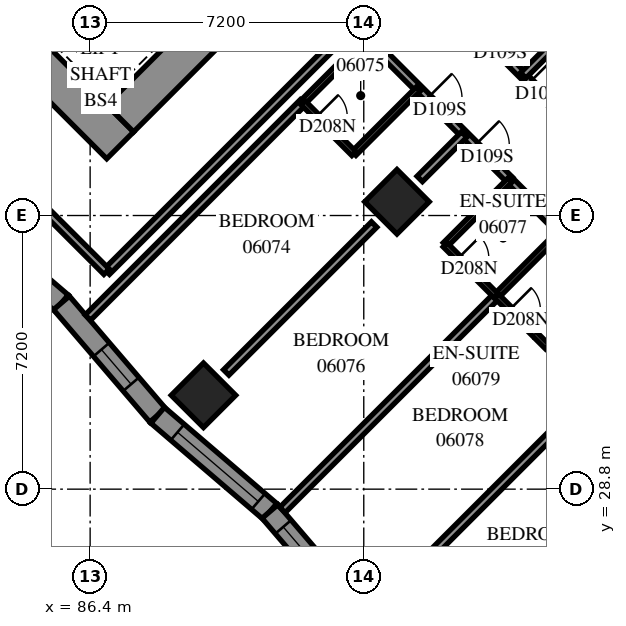
"""IFC4 building model, lengths in metres.
Left out: names, types, materials, properties, quantities, classifications, styles, units other than length and angle.
Written with IfcOpenShell. Run it as: python <this file> out.ifc"""

import sys

from ifc_helpers import new_model, si_unit, direction, frame, frame_2d, origin, origin_2d, place, context, subcontext, project, spatial, polyline, rectangle, outline, extrude, element, fill, save


model = new_model("IFC4")
c1 = context("Model", 3, precision=1e-05, world=origin(), true_north=direction((0.0, 1.0)))
c2 = subcontext(c1, "Body", "Model", "MODEL_VIEW")
j1 = project(units=[si_unit("LENGTHUNIT", "METRE"), si_unit("PLANEANGLEUNIT", "RADIAN")], contexts=[c1])
p1 = place(None, origin())
s1 = spatial("IfcSite", under=j1, at=p1, CompositionType="ELEMENT")
p2 = place(p1, origin())
s2 = spatial("IfcBuilding", under=s1, at=p2, CompositionType="ELEMENT")
p3 = place(p2, frame((0.0, 0.0, 27.0)))
s3 = spatial("IfcBuildingStorey", under=s2, at=p3, CompositionType="ELEMENT", Elevation=27.0)
for number, where, z_axis, x_axis in (
    (1, (94.474, 36.362, 0.0), (0.0, 0.0, 1.0), (0.707, -0.707, 0.0)),
    (2, (89.382, 31.271, 0.0), (0.0, 0.0, 1.0), (0.707, -0.707, 0.0)),
):
    element("IfcColumn", number, at=place(p3, frame(where, z_axis=z_axis, x_axis=x_axis)), inside=s3, PredefinedType="COLUMN", context=c2, shape_type="SweptSolid", body=[
        extrude(rectangle(XDim=1.2, YDim=1.2, at=origin_2d()), origin(), (0.0, 0.0, 1.0), 3.1),
    ])
p4 = place(p3, frame((75.594, 49.443, -0.3), z_axis=(0.0, 0.0, 1.0), x_axis=(0.7071037324, -0.70710983, 0.0)))
e3 = element("IfcWall", 3, at=p4, inside=s3, PredefinedType="SHEAR", context=c2, shape_type="SweptSolid", body=[
    extrude(rectangle(XDim=16.4, YDim=1.0, at=frame_2d((8.2, 0.0))), origin(), (0.0, 0.0, 1.0), 2.7),
])
p5 = place(p3, frame((87.19, 38.554, -0.3), z_axis=(0.0, 0.0, 1.0), x_axis=(0.707103309, 0.7071102534, 0.0)))
e4 = element("IfcWall", 4, at=p5, inside=s3, PredefinedType="SHEAR", context=c2, shape_type="SweptSolid", body=[
    extrude(rectangle(XDim=14.4, YDim=1.0, at=frame_2d((7.2, 0.0))), origin(), (0.0, 0.0, 1.0), 2.7),
])
p6 = place(p5, frame((4.55, 0.0, 0.3)))
e5 = element("IfcOpeningElement", 5, at=p6, cuts=e4, PredefinedType="OPENING", context=c2, shape_type="SweptSolid", body=[
    extrude(rectangle(XDim=1.1, YDim=2.1, at=frame_2d((0.55, 1.05))), frame((0.0, 0.51, 0.0), z_axis=(0.0, -1.0, 0.0), x_axis=(1.0, 0.0, 0.0)), (0.0, 0.0, 1.0), 1.02),
])
p7 = place(p5, frame((11.35, 0.0, 0.3)))
e6 = element("IfcOpeningElement", 6, at=p7, cuts=e4, PredefinedType="OPENING", context=c2, shape_type="SweptSolid", body=[
    extrude(rectangle(XDim=1.1, YDim=2.1, at=frame_2d((0.55, 1.05))), frame((0.0, 0.51, 0.0), z_axis=(0.0, -1.0, 0.0), x_axis=(1.0, 0.0, 0.0)), (0.0, 0.0, 1.0), 1.02),
])
p8 = place(p3, frame((82.69, 36.232, 0.0), z_axis=(0.0, 0.0, 1.0), x_axis=(0.7595050452, -0.6505014115, 0.0)))
e7 = element("IfcWall", 7, at=p8, inside=s3, PredefinedType="SOLIDWALL", context=c2, shape_type="SweptSolid", body=[
    extrude(outline(polyline([(-0.021, -0.275), (3.87, -0.275), (3.913, 0.275), (0.021, 0.275), (-0.021, -0.275)])), origin(), (0.0, 0.0, 1.0), 3.1),
])
p9 = place(p8, frame((1.768, 0.0, 0.5)))
e8 = element("IfcOpeningElement", 8, at=p9, cuts=e7, PredefinedType="OPENING", context=c2, shape_type="SweptSolid", body=[
    extrude(rectangle(XDim=1.2, YDim=2.45, at=frame_2d((0.6, 1.225))), frame((0.0, 0.285, 0.0), z_axis=(0.0, -1.0, 0.0), x_axis=(1.0, 0.0, 0.0)), (0.0, 0.0, 1.0), 0.57),
])
p10 = place(p3, frame((85.645, 33.7, 0.0), z_axis=(0.0, 0.0, 1.0), x_axis=(0.6505014115, -0.7595050452, 0.0)))
e9 = element("IfcWall", 9, at=p10, inside=s3, PredefinedType="SOLIDWALL", context=c2, shape_type="SweptSolid", body=[
    extrude(outline(polyline([(0.021, -0.275), (3.913, -0.275), (3.87, 0.275), (-0.021, 0.275), (0.021, -0.275)])), origin(), (0.0, 0.0, 1.0), 3.1),
])
p11 = place(p10, frame((1.617, 0.0, 0.5)))
e10 = element("IfcOpeningElement", 10, at=p11, cuts=e9, PredefinedType="OPENING", context=c2, shape_type="SweptSolid", body=[
    extrude(rectangle(XDim=1.2, YDim=2.45, at=frame_2d((0.6, 1.225))), frame((0.0, 0.285, 0.0), z_axis=(0.0, -1.0, 0.0), x_axis=(1.0, 0.0, 0.0)), (0.0, 0.0, 1.0), 0.57),
])
p12 = place(p3, frame((88.177, 30.745, 0.0), z_axis=(0.0, 0.0, 1.0), x_axis=(0.7595159183, -0.6504887161, 0.0)))
e11 = element("IfcWall", 11, at=p12, inside=s3, PredefinedType="SOLIDWALL", context=c2, shape_type="SweptSolid", body=[
    extrude(outline(polyline([(-0.021, -0.275), (3.87, -0.275), (3.913, 0.275), (0.021, 0.275), (-0.021, -0.275)])), origin(), (0.0, 0.0, 1.0), 3.1),
])
p13 = place(p12, frame((0.687, 0.0, 0.5)))
e12 = element("IfcOpeningElement", 12, at=p13, cuts=e11, PredefinedType="OPENING", context=c2, shape_type="SweptSolid", body=[
    extrude(rectangle(XDim=2.8, YDim=2.45, at=frame_2d((1.4, 1.225))), frame((0.0, 0.285, 0.0), z_axis=(0.0, -1.0, 0.0), x_axis=(1.0, 0.0, 0.0)), (0.0, 0.0, 1.0), 0.57),
])
p14 = place(p3, frame((91.133, 28.213, 0.0), z_axis=(0.0, 0.0, 1.0), x_axis=(0.6504887161, -0.7595159183, 0.0)))
e13 = element("IfcWall", 13, at=p14, inside=s3, PredefinedType="SOLIDWALL", context=c2, shape_type="SweptSolid", body=[
    extrude(outline(polyline([(0.021, -0.275), (3.913, -0.275), (3.87, 0.275), (-0.021, 0.275), (0.021, -0.275)])), origin(), (0.0, 0.0, 1.0), 3.1),
])
p15 = place(p14, frame((0.535, 0.0, 0.5)))
e14 = element("IfcOpeningElement", 14, at=p15, cuts=e13, PredefinedType="OPENING", context=c2, shape_type="SweptSolid", body=[
    extrude(rectangle(XDim=2.8, YDim=2.45, at=frame_2d((1.4, 1.225))), frame((0.0, 0.285, 0.0), z_axis=(0.0, -1.0, 0.0), x_axis=(1.0, 0.0, 0.0)), (0.0, 0.0, 1.0), 0.57),
])
p16 = place(p3, frame((94.895, 42.581, 0.0), z_axis=(0.0, 0.0, 1.0), x_axis=(0.7071067812, -0.7071067812, 0.0)))
e15 = element("IfcWall", 15, at=p16, inside=s3, PredefinedType="PARTITIONING", context=c2, shape_type="SweptSolid", body=[
    extrude(rectangle(XDim=14.9, YDim=0.2, at=frame_2d((7.45, 0.0))), origin(), (0.0, 0.0, 1.0), 3.1),
])
p17 = place(p16, frame((2.8, 0.0, 0.0)))
e16 = element("IfcOpeningElement", 16, at=p17, cuts=e15, PredefinedType="OPENING", context=c2, shape_type="SweptSolid", body=[
    extrude(rectangle(XDim=0.9, YDim=2.1, at=frame_2d((0.45, 1.05))), frame((0.0, 0.11, 0.0), z_axis=(0.0, -1.0, 0.0), x_axis=(1.0, 0.0, 0.0)), (0.0, 0.0, 1.0), 0.22),
])
p18 = place(p16, frame((4.348, 0.0, 0.0)))
e17 = element("IfcOpeningElement", 17, at=p18, cuts=e15, PredefinedType="OPENING", context=c2, shape_type="SweptSolid", body=[
    extrude(rectangle(XDim=0.9, YDim=2.1, at=frame_2d((0.45, 1.05))), frame((0.0, 0.11, 0.0), z_axis=(0.0, -1.0, 0.0), x_axis=(1.0, 0.0, 0.0)), (0.0, 0.0, 1.0), 0.22),
])
p19 = place(p16, frame((10.073, 0.0, 0.0)))
e18 = element("IfcOpeningElement", 18, at=p19, cuts=e15, PredefinedType="OPENING", context=c2, shape_type="SweptSolid", body=[
    extrude(rectangle(XDim=1.0, YDim=2.1, at=frame_2d((0.5, 1.05))), frame((0.0, 0.11, 0.0), z_axis=(0.0, -1.0, 0.0), x_axis=(1.0, 0.0, 0.0)), (0.0, 0.0, 1.0), 0.22),
])
p20 = place(p3, frame((86.838, 34.522, 0.0), z_axis=(0.0, 0.0, 1.0), x_axis=(0.7072154749, 0.7069980708, 0.0)))
e19 = element("IfcWall", 19, at=p20, inside=s3, PredefinedType="PARTITIONING", context=c2, shape_type="SweptSolid", body=[
    extrude(rectangle(XDim=9.2, YDim=0.2, at=frame_2d((4.6, 0.0))), origin(), (0.0, 0.0, 1.0), 3.1),
])
p21 = place(p3, frame((86.339, 33.313, 0.0), z_axis=(0.0, 0.0, 1.0), x_axis=(0.7069756325, 0.7072379055, 0.0)))
e20 = element("IfcWall", 20, at=p21, inside=s3, PredefinedType="PARTITIONING", context=c2, shape_type="SweptSolid", body=[
    extrude(rectangle(XDim=8.007, YDim=0.2, at=frame_2d((4.003, 0.0))), origin(), (0.0, 0.0, 1.0), 3.1),
])
p22 = place(p3, frame((96.54, 23.157, 0.0), z_axis=(0.0, 0.0, 1.0), x_axis=(0.7071067812, 0.7071067812, 0.0)))
e21 = element("IfcWall", 21, at=p22, inside=s3, PredefinedType="PARTITIONING", context=c2, shape_type="SweptSolid", body=[
    extrude(rectangle(XDim=7.977, YDim=0.2, at=frame_2d((3.989, 0.0))), origin(), (0.0, 0.0, 1.0), 3.1),
])
p23 = place(p3, frame((91.461, 28.253, 0.0), z_axis=(0.0, 0.0, 1.0), x_axis=(0.707238618, 0.7069749198, 0.0)))
e22 = element("IfcWall", 22, at=p23, inside=s3, PredefinedType="PARTITIONING", context=c2, shape_type="SweptSolid", body=[
    extrude(rectangle(XDim=7.964, YDim=0.2, at=frame_2d((3.982, 0.0))), origin(), (0.0, 0.0, 1.0), 3.1),
])
p24 = place(p3, frame((102.531, 31.833, 0.0), z_axis=(0.0, 0.0, 1.0), x_axis=(-0.7070095491, 0.7072039999, 0.0)))
e23 = element("IfcWall", 23, at=p24, inside=s3, PredefinedType="PARTITIONING", context=c2, shape_type="SweptSolid", body=[
    extrude(rectangle(XDim=7.2, YDim=0.2, at=frame_2d((3.6, 0.0))), origin(), (0.0, 0.0, 1.0), 3.1),
])
p25 = place(p24, frame((2.165, 0.0, 0.0)))
e24 = element("IfcOpeningElement", 24, at=p25, cuts=e23, PredefinedType="OPENING", context=c2, shape_type="SweptSolid", body=[
    extrude(rectangle(XDim=0.9, YDim=2.1, at=frame_2d((0.45, 1.05))), frame((0.0, 0.11, 0.0), z_axis=(0.0, -1.0, 0.0), x_axis=(1.0, 0.0, 0.0)), (0.0, 0.0, 1.0), 0.22),
])
p26 = place(p24, frame((0.4, 0.0, 0.0)))
e25 = element("IfcOpeningElement", 25, at=p26, cuts=e23, PredefinedType="OPENING", context=c2, shape_type="SweptSolid", body=[
    extrude(rectangle(XDim=0.9, YDim=2.1, at=frame_2d((0.45, 1.05))), frame((0.0, 0.11, 0.0), z_axis=(0.0, -1.0, 0.0), x_axis=(1.0, 0.0, 0.0)), (0.0, 0.0, 1.0), 0.22),
])
p27 = place(p3, frame((89.981, 31.871, 0.0), z_axis=(0.0, 0.0, 1.0), x_axis=(0.7071067812, 0.7071067812, 0.0)))
e26 = element("IfcWall", 26, at=p27, inside=s3, PredefinedType="PARTITIONING", context=c2, shape_type="SweptSolid", body=[
    extrude(rectangle(XDim=5.504, YDim=0.2, at=frame_2d((2.752, 0.0))), origin(), (0.0, 0.0, 1.0), 3.1),
])
p28 = place(p3, frame((95.073, 26.781, 0.0), z_axis=(0.0, 0.0, 1.0), x_axis=(0.7071067812, 0.7071067812, 0.0)))
e27 = element("IfcWall", 27, at=p28, inside=s3, PredefinedType="PARTITIONING", context=c2, shape_type="SweptSolid", body=[
    extrude(rectangle(XDim=5.501, YDim=0.2, at=frame_2d((2.751, 0.0))), origin(), (0.0, 0.0, 1.0), 3.1),
])
p29 = place(p3, frame((93.699, 40.679, 0.0), z_axis=(0.0, 0.0, 1.0), x_axis=(0.7071067812, -0.7071067812, 0.0)))
e28 = element("IfcWall", 28, at=p29, inside=s3, PredefinedType="PARTITIONING", context=c2, shape_type="SweptSolid", body=[
    extrude(rectangle(XDim=5.301, YDim=0.2, at=frame_2d((2.65, 0.0))), origin(), (0.0, 0.0, 1.0), 3.1),
])
p30 = place(p29, frame((2.242, 0.0, 0.0)))
e29 = element("IfcOpeningElement", 29, at=p30, cuts=e28, PredefinedType="OPENING", context=c2, shape_type="SweptSolid", body=[
    extrude(rectangle(XDim=0.9, YDim=2.1, at=frame_2d((0.45, 1.05))), frame((0.0, 0.11, 0.0), z_axis=(0.0, -1.0, 0.0), x_axis=(1.0, 0.0, 0.0)), (0.0, 0.0, 1.0), 0.22),
])
p31 = place(p29, frame((4.002, 0.0, 0.0)))
e30 = element("IfcOpeningElement", 30, at=p31, cuts=e28, PredefinedType="OPENING", context=c2, shape_type="SweptSolid", body=[
    extrude(rectangle(XDim=0.9, YDim=2.1, at=frame_2d((0.45, 1.05))), frame((0.0, 0.11, 0.0), z_axis=(0.0, -1.0, 0.0), x_axis=(1.0, 0.0, 0.0)), (0.0, 0.0, 1.0), 0.22),
])
p32 = place(p3, frame((84.889, 36.465, 0.0), z_axis=(0.0, 0.0, 1.0), x_axis=(0.7071067812, -0.7071067812, 0.0)))
e31 = element("IfcWall", 31, at=p32, inside=s3, PredefinedType="PARTITIONING", context=c2, shape_type="SweptSolid", body=[
    extrude(rectangle(XDim=2.749, YDim=0.2, at=frame_2d((1.375, 0.0))), origin(), (0.0, 0.0, 1.0), 3.1),
])
for number, where, z_axis, x_axis in (
    (32, (93.341, 37.635, 0.0), (0.0, 0.0, 1.0), (0.707, 0.707, 0.0)),
    (33, (95.745, 35.231, 0.0), (0.0, 0.0, 1.0), (0.707, 0.707, 0.0)),
    (34, (91.997, 38.979, 0.0), (0.0, 0.0, 1.0), (0.707, 0.707, 0.0)),
):
    element("IfcWall", number, at=place(p3, frame(where, z_axis=z_axis, x_axis=x_axis)), inside=s3, PredefinedType="PARTITIONING", context=c2, shape_type="SweptSolid", body=[
        extrude(rectangle(XDim=2.401, YDim=0.15, at=frame_2d((1.201, 0.0))), origin(), (0.0, 0.0, 1.0), 3.1),
    ])
p33 = place(p3, frame((97.092, 33.884, 0.0), z_axis=(0.0, 0.0, 1.0), x_axis=(0.706689978, 0.7075233388, 0.0)))
e35 = element("IfcWall", 35, at=p33, inside=s3, PredefinedType="PARTITIONING", context=c2, shape_type="SweptSolid", body=[
    extrude(rectangle(XDim=2.4, YDim=0.15, at=frame_2d((1.2, 0.0))), origin(), (0.0, 0.0, 1.0), 3.1),
])
p34 = place(p3, frame((98.433, 32.545, 0.0), z_axis=(0.0, 0.0, 1.0), x_axis=(0.7071067812, 0.7071067812, 0.0)))
e36 = element("IfcWall", 36, at=p34, inside=s3, PredefinedType="PARTITIONING", context=c2, shape_type="SweptSolid", body=[
    extrude(rectangle(XDim=2.398, YDim=0.15, at=frame_2d((1.199, 0.0))), origin(), (0.0, 0.0, 1.0), 3.1),
])
p35 = place(p3, frame((95.743, 35.227, 0.0), z_axis=(0.0, 0.0, 1.0), x_axis=(0.7071067812, -0.7071067812, 0.0)))
e37 = element("IfcWall", 37, at=p35, inside=s3, PredefinedType="PARTITIONING", context=c2, shape_type="SweptSolid", body=[
    extrude(rectangle(XDim=1.901, YDim=0.15, at=frame_2d((0.95, 0.0))), origin(), (0.0, 0.0, 1.0), 3.1),
])
p36 = place(p35, frame((0.491, 0.0, 0.0)))
e38 = element("IfcOpeningElement", 38, at=p36, cuts=e37, PredefinedType="OPENING", context=c2, shape_type="SweptSolid", body=[
    extrude(rectangle(XDim=0.8, YDim=2.1, at=frame_2d((0.4, 1.05))), frame((0.0, 0.085, 0.0), z_axis=(0.0, -1.0, 0.0), x_axis=(1.0, 0.0, 0.0)), (0.0, 0.0, 1.0), 0.17),
])
p37 = place(p3, frame((91.995, 38.975, 0.0), z_axis=(0.0, 0.0, 1.0), x_axis=(0.7071067812, -0.7071067812, 0.0)))
e39 = element("IfcWall", 39, at=p37, inside=s3, PredefinedType="PARTITIONING", context=c2, shape_type="SweptSolid", body=[
    extrude(rectangle(XDim=1.901, YDim=0.15, at=frame_2d((0.95, 0.0))), origin(), (0.0, 0.0, 1.0), 3.1),
])
p38 = place(p37, frame((0.523, 0.0, 0.0)))
e40 = element("IfcOpeningElement", 40, at=p38, cuts=e39, PredefinedType="OPENING", context=c2, shape_type="SweptSolid", body=[
    extrude(rectangle(XDim=0.8, YDim=2.1, at=frame_2d((0.4, 1.05))), frame((0.0, 0.085, 0.0), z_axis=(0.0, -1.0, 0.0), x_axis=(1.0, 0.0, 0.0)), (0.0, 0.0, 1.0), 0.17),
])
p39 = place(p3, frame((97.09, 33.886, 0.0), z_axis=(0.0, 0.0, 1.0), x_axis=(0.7076330979, -0.7065800724, 0.0)))
e41 = element("IfcWall", 41, at=p39, inside=s3, PredefinedType="PARTITIONING", context=c2, shape_type="SweptSolid", body=[
    extrude(rectangle(XDim=1.899, YDim=0.15, at=frame_2d((0.95, 0.0))), origin(), (0.0, 0.0, 1.0), 3.1),
])
p40 = place(p39, frame((0.504, 0.0, 0.0)))
e42 = element("IfcOpeningElement", 42, at=p40, cuts=e41, PredefinedType="OPENING", context=c2, shape_type="SweptSolid", body=[
    extrude(rectangle(XDim=0.8, YDim=2.1, at=frame_2d((0.4, 1.05))), frame((0.0, 0.085, 0.0), z_axis=(0.0, -1.0, 0.0), x_axis=(1.0, 0.0, 0.0)), (0.0, 0.0, 1.0), 0.17),
])
for number, where, z_axis, x_axis in (
    (43, (97.796, 39.686, 0.0), (0.0, 0.0, 1.0), (0.707, 0.707, 0.0)),
    (44, (95.073, 36.963, 0.0), (0.0, 0.0, 1.0), (0.707, 0.707, 0.0)),
):
    element("IfcWall", number, at=place(p3, frame(where, z_axis=z_axis, x_axis=x_axis)), inside=s3, PredefinedType="PARTITIONING", context=c2, shape_type="SweptSolid", body=[
        extrude(rectangle(XDim=1.652, YDim=0.2, at=frame_2d((0.826, 0.0))), origin(), (0.0, 0.0, 1.0), 3.1),
    ])
p41 = place(p11, origin())
e45 = element("IfcWindow", 45, at=p41, inside=s3, PartitioningType="SINGLE_PANEL", PredefinedType="WINDOW", context=c2, shape_type="SweptSolid", body=[
    extrude(rectangle(XDim=1.2, YDim=2.45, at=frame_2d((0.6, 1.225))), frame((0.0, 0.155, 0.0), z_axis=(0.0, -1.0, 0.0), x_axis=(1.0, 0.0, 0.0)), (0.0, 0.0, 1.0), 0.06),
])
fill(e10, e45)
p42 = place(p13, origin())
e46 = element("IfcWindow", 46, at=p42, inside=s3, PartitioningType="SINGLE_PANEL", PredefinedType="WINDOW", context=c2, shape_type="SweptSolid", body=[
    extrude(rectangle(XDim=2.8, YDim=2.45, at=frame_2d((1.4, 1.225))), frame((0.0, 0.155, 0.0), z_axis=(0.0, -1.0, 0.0), x_axis=(1.0, 0.0, 0.0)), (0.0, 0.0, 1.0), 0.06),
])
fill(e12, e46)
p43 = place(p15, origin())
e47 = element("IfcWindow", 47, at=p43, inside=s3, PartitioningType="SINGLE_PANEL", PredefinedType="WINDOW", context=c2, shape_type="SweptSolid", body=[
    extrude(rectangle(XDim=2.8, YDim=2.45, at=frame_2d((1.4, 1.225))), frame((0.0, 0.155, 0.0), z_axis=(0.0, -1.0, 0.0), x_axis=(1.0, 0.0, 0.0)), (0.0, 0.0, 1.0), 0.06),
])
fill(e14, e47)
p44 = place(p17, origin())
e48 = element("IfcDoor", 48, at=p44, inside=s3, OperationType="SINGLE_SWING_RIGHT", PredefinedType="DOOR", context=c2, shape_type="SweptSolid", body=[
    extrude(rectangle(XDim=0.9, YDim=2.1, at=frame_2d((0.45, 1.05))), frame((0.0, 0.025, 0.0), z_axis=(0.0, -1.0, 0.0), x_axis=(1.0, 0.0, 0.0)), (0.0, 0.0, 1.0), 0.05),
])
fill(e16, e48)
p45 = place(p18, origin())
e49 = element("IfcDoor", 49, at=p45, inside=s3, OperationType="SINGLE_SWING_LEFT", PredefinedType="DOOR", context=c2, shape_type="SweptSolid", body=[
    extrude(rectangle(XDim=0.9, YDim=2.1, at=frame_2d((0.45, 1.05))), frame((0.0, 0.025, 0.0), z_axis=(0.0, -1.0, 0.0), x_axis=(1.0, 0.0, 0.0)), (0.0, 0.0, 1.0), 0.05),
])
fill(e17, e49)
p46 = place(p30, origin())
e50 = element("IfcDoor", 50, at=p46, inside=s3, OperationType="SINGLE_SWING_LEFT", PredefinedType="DOOR", context=c2, shape_type="SweptSolid", body=[
    extrude(rectangle(XDim=0.9, YDim=2.1, at=frame_2d((0.45, 1.05))), frame((0.0, 0.025, 0.0), z_axis=(0.0, -1.0, 0.0), x_axis=(1.0, 0.0, 0.0)), (0.0, 0.0, 1.0), 0.05),
])
fill(e29, e50)
p47 = place(p38, origin())
e51 = element("IfcDoor", 51, at=p47, inside=s3, OperationType="SINGLE_SWING_RIGHT", PredefinedType="DOOR", context=c2, shape_type="SweptSolid", body=[
    extrude(rectangle(XDim=0.8, YDim=2.1, at=frame_2d((0.4, 1.05))), frame((0.0, 0.025, 0.0), z_axis=(0.0, -1.0, 0.0), x_axis=(1.0, 0.0, 0.0)), (0.0, 0.0, 1.0), 0.05),
])
fill(e40, e51)
p48 = place(p31, origin())
e52 = element("IfcDoor", 52, at=p48, inside=s3, OperationType="SINGLE_SWING_RIGHT", PredefinedType="DOOR", context=c2, shape_type="SweptSolid", body=[
    extrude(rectangle(XDim=0.9, YDim=2.1, at=frame_2d((0.45, 1.05))), frame((0.0, 0.025, 0.0), z_axis=(0.0, -1.0, 0.0), x_axis=(1.0, 0.0, 0.0)), (0.0, 0.0, 1.0), 0.05),
])
fill(e30, e52)
p49 = place(p36, origin())
e53 = element("IfcDoor", 53, at=p49, inside=s3, OperationType="SINGLE_SWING_RIGHT", PredefinedType="DOOR", context=c2, shape_type="SweptSolid", body=[
    extrude(rectangle(XDim=0.8, YDim=2.1, at=frame_2d((0.4, 1.05))), frame((0.0, 0.025, 0.0), z_axis=(0.0, -1.0, 0.0), x_axis=(1.0, 0.0, 0.0)), (0.0, 0.0, 1.0), 0.05),
])
fill(e38, e53)
p50 = place(p40, origin())
e54 = element("IfcDoor", 54, at=p50, inside=s3, OperationType="SINGLE_SWING_RIGHT", PredefinedType="DOOR", context=c2, shape_type="SweptSolid", body=[
    extrude(rectangle(XDim=0.8, YDim=2.1, at=frame_2d((0.4, 1.05))), frame((0.0, 0.025, 0.0), z_axis=(0.0, -1.0, 0.0), x_axis=(1.0, 0.0, 0.0)), (0.0, 0.0, 1.0), 0.05),
])
fill(e42, e54)
save(model, sys.argv[1])
